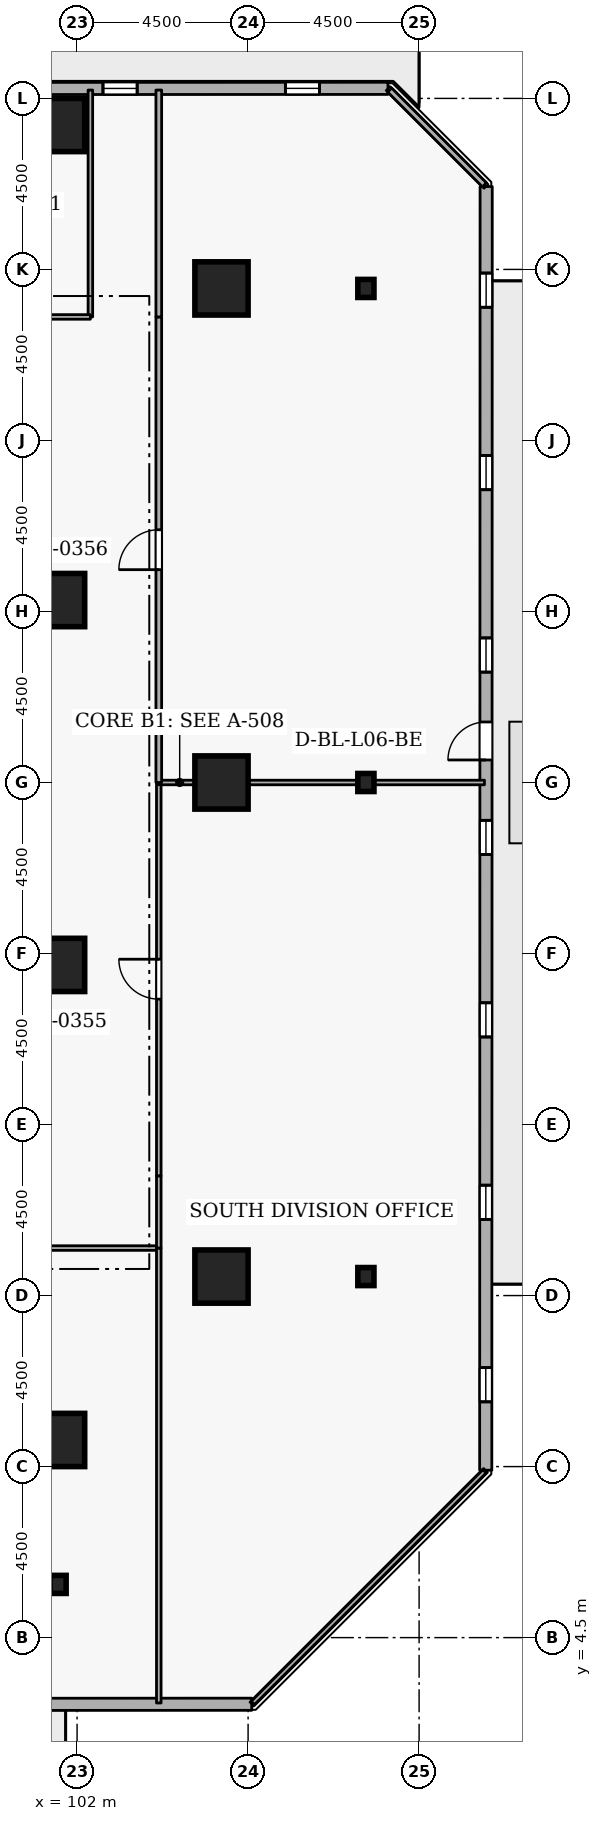
"""IFC4 building model, lengths in metres.
Left out: names, types, materials, properties, quantities, classifications, styles, units other than length and angle.
Written with IfcOpenShell. Run it as: python <this file> out.ifc"""

import sys

from ifc_helpers import new_model, si_unit, direction, frame, frame_2d, origin, origin_2d, place, context, subcontext, project, spatial, rectangle, i_section, extrude, element, fill, save


model = new_model("IFC4")
c1 = context("Model", 3, precision=1e-05, world=origin(), true_north=direction((0.0, 1.0)))
c2 = subcontext(c1, "Body", "Model", "MODEL_VIEW")
j1 = project(units=[si_unit("LENGTHUNIT", "METRE"), si_unit("PLANEANGLEUNIT", "RADIAN")], contexts=[c1])
p1 = place(None, origin())
s1 = spatial("IfcSite", under=j1, at=p1, CompositionType="ELEMENT")
p2 = place(p1, origin())
s2 = spatial("IfcBuilding", under=s1, at=p2, CompositionType="ELEMENT")
p3 = place(p2, frame((0.0, 0.0, 27.9)))
s3 = spatial("IfcBuildingStorey", under=s2, at=p3, CompositionType="ELEMENT", Elevation=27.9)
for number, where, z_axis, x_axis in (
    (1, (105.8, 14.0, 0.0), (0.0, 0.0, 1.0), (1.0, 0.0, 0.0)),
    (2, (105.8, 27.0, 0.0), (0.0, 0.0, 1.0), (1.0, 0.0, 0.0)),
    (3, (105.8, 40.0, 0.0), (0.0, 0.0, 1.0), (1.0, 0.0, 0.0)),
    (4, (101.5, 44.3, 0.0), (0.0, 0.0, 1.0), (1.0, 0.0, 0.0)),
    (5, (101.5, 9.7, 0.0), (0.0, 0.0, 1.0), (1.0, 0.0, 0.0)),
    (6, (101.5, 22.2, 0.0), (0.0, 0.0, 1.0), (1.0, 0.0, 0.0)),
    (7, (101.5, 31.8, 0.0), (0.0, 0.0, 1.0), (1.0, 0.0, 0.0)),
):
    element("IfcColumn", number, at=place(p3, frame(where, z_axis=z_axis, x_axis=x_axis)), inside=s3, PredefinedType="COLUMN", context=c2, shape_type="SweptSolid", body=[
        extrude(rectangle(XDim=1.4, YDim=1.4, at=origin_2d()), origin(), (0.0, 0.0, 1.0), 3.6),
    ])
for number, where, z_axis, x_axis in (
    (8, (109.6, 14.0, 0.0), (0.0, 0.0, 1.0), (1.0, 0.0, 0.0)),
    (9, (109.6, 27.0, 0.0), (0.0, 0.0, 1.0), (1.0, 0.0, 0.0)),
    (10, (109.6, 40.0, 0.0), (0.0, 0.0, 1.0), (1.0, 0.0, 0.0)),
    (11, (101.5, 5.9, 0.0), (0.0, 0.0, 1.0), (1.0, 0.0, 0.0)),
):
    element("IfcColumn", number, at=place(p3, frame(where, z_axis=z_axis, x_axis=x_axis)), inside=s3, PredefinedType="COLUMN", context=c2, shape_type="SweptSolid", body=[
        extrude(i_section(OverallWidth=0.424, OverallDepth=0.475, WebThickness=0.048, FlangeThickness=0.077, FilletRadius=0.015, at=origin_2d()), origin(), (0.0, 0.0, 1.0), 3.6),
    ])
p4 = place(p3, frame((72.819, 2.735, 0.0), z_axis=(0.0, 0.0, 1.0), x_axis=(0.999999942296, 0.000339718087, 0.0)))
e12 = element("IfcWall", 12, at=p4, inside=s3, PredefinedType="STANDARD", context=c2, shape_type="SweptSolid", body=[
    extrude(rectangle(XDim=33.777, YDim=0.32, at=frame_2d((16.888, 0.0))), origin(), (0.0, 0.0, 1.0), 2.7),
])
p5 = place(p4, frame((18.688, 0.0, 0.0)))
e13 = element("IfcOpeningElement", 13, at=p5, cuts=e12, PredefinedType="OPENING", context=c2, shape_type="SweptSolid", body=[
    extrude(rectangle(XDim=1.0, YDim=2.08, at=frame_2d((0.5, 1.04))), frame((0.0, 0.17, 0.0), z_axis=(0.0, -1.0, 0.0), x_axis=(1.0, 0.0, 0.0)), (0.0, 0.0, 1.0), 0.34),
])
p6 = place(p4, frame((1.8, 0.0, 0.72)))
e14 = element("IfcOpeningElement", 14, at=p6, cuts=e12, PredefinedType="OPENING", context=c2, shape_type="SweptSolid", body=[
    extrude(rectangle(XDim=0.9, YDim=1.75, at=frame_2d((0.45, 0.875))), frame((0.0, 0.17, 0.0), z_axis=(0.0, -1.0, 0.0), x_axis=(1.0, 0.0, 0.0)), (0.0, 0.0, 1.0), 0.34),
])
p7 = place(p4, frame((6.6, 0.0, 0.72)))
e15 = element("IfcOpeningElement", 15, at=p7, cuts=e12, PredefinedType="OPENING", context=c2, shape_type="SweptSolid", body=[
    extrude(rectangle(XDim=0.9, YDim=1.75, at=frame_2d((0.45, 0.875))), frame((0.0, 0.17, 0.0), z_axis=(0.0, -1.0, 0.0), x_axis=(1.0, 0.0, 0.0)), (0.0, 0.0, 1.0), 0.34),
])
p8 = place(p4, frame((11.4, 0.0, 0.72)))
e16 = element("IfcOpeningElement", 16, at=p8, cuts=e12, PredefinedType="OPENING", context=c2, shape_type="SweptSolid", body=[
    extrude(rectangle(XDim=0.9, YDim=1.75, at=frame_2d((0.45, 0.875))), frame((0.0, 0.17, 0.0), z_axis=(0.0, -1.0, 0.0), x_axis=(1.0, 0.0, 0.0)), (0.0, 0.0, 1.0), 0.34),
])
p9 = place(p4, frame((16.2, 0.0, 0.72)))
e17 = element("IfcOpeningElement", 17, at=p9, cuts=e12, PredefinedType="OPENING", context=c2, shape_type="SweptSolid", body=[
    extrude(rectangle(XDim=0.9, YDim=1.75, at=frame_2d((0.45, 0.875))), frame((0.0, 0.17, 0.0), z_axis=(0.0, -1.0, 0.0), x_axis=(1.0, 0.0, 0.0)), (0.0, 0.0, 1.0), 0.34),
])
p10 = place(p4, frame((21.0, 0.0, 0.72)))
e18 = element("IfcOpeningElement", 18, at=p10, cuts=e12, PredefinedType="OPENING", context=c2, shape_type="SweptSolid", body=[
    extrude(rectangle(XDim=0.9, YDim=1.75, at=frame_2d((0.45, 0.875))), frame((0.0, 0.17, 0.0), z_axis=(0.0, -1.0, 0.0), x_axis=(1.0, 0.0, 0.0)), (0.0, 0.0, 1.0), 0.34),
])
p11 = place(p4, frame((25.8, 0.0, 0.72)))
e19 = element("IfcOpeningElement", 19, at=p11, cuts=e12, PredefinedType="OPENING", context=c2, shape_type="SweptSolid", body=[
    extrude(rectangle(XDim=0.9, YDim=1.75, at=frame_2d((0.45, 0.875))), frame((0.0, 0.17, 0.0), z_axis=(0.0, -1.0, 0.0), x_axis=(1.0, 0.0, 0.0)), (0.0, 0.0, 1.0), 0.34),
])
p12 = place(p3, frame((112.753, 8.904, 0.0), z_axis=(0.0, 0.0, 1.0), x_axis=(0.000339718087, 0.999999942296, 0.0)))
e20 = element("IfcWall", 20, at=p12, inside=s3, PredefinedType="STANDARD", context=c2, shape_type="SweptSolid", body=[
    extrude(rectangle(XDim=33.777, YDim=0.32, at=frame_2d((16.888, 0.0))), origin(), (0.0, 0.0, 1.0), 2.7),
])
p13 = place(p12, frame((18.688, 0.0, 0.0)))
e21 = element("IfcOpeningElement", 21, at=p13, cuts=e20, PredefinedType="OPENING", context=c2, shape_type="SweptSolid", body=[
    extrude(rectangle(XDim=1.0, YDim=2.08, at=frame_2d((0.5, 1.04))), frame((0.0, 0.17, 0.0), z_axis=(0.0, -1.0, 0.0), x_axis=(1.0, 0.0, 0.0)), (0.0, 0.0, 1.0), 0.34),
])
p14 = place(p12, frame((1.8, 0.0, 0.72)))
e22 = element("IfcOpeningElement", 22, at=p14, cuts=e20, PredefinedType="OPENING", context=c2, shape_type="SweptSolid", body=[
    extrude(rectangle(XDim=0.9, YDim=1.75, at=frame_2d((0.45, 0.875))), frame((0.0, 0.17, 0.0), z_axis=(0.0, -1.0, 0.0), x_axis=(1.0, 0.0, 0.0)), (0.0, 0.0, 1.0), 0.34),
])
p15 = place(p12, frame((6.6, 0.0, 0.72)))
e23 = element("IfcOpeningElement", 23, at=p15, cuts=e20, PredefinedType="OPENING", context=c2, shape_type="SweptSolid", body=[
    extrude(rectangle(XDim=0.9, YDim=1.75, at=frame_2d((0.45, 0.875))), frame((0.0, 0.17, 0.0), z_axis=(0.0, -1.0, 0.0), x_axis=(1.0, 0.0, 0.0)), (0.0, 0.0, 1.0), 0.34),
])
p16 = place(p12, frame((11.4, 0.0, 0.72)))
e24 = element("IfcOpeningElement", 24, at=p16, cuts=e20, PredefinedType="OPENING", context=c2, shape_type="SweptSolid", body=[
    extrude(rectangle(XDim=0.9, YDim=1.75, at=frame_2d((0.45, 0.875))), frame((0.0, 0.17, 0.0), z_axis=(0.0, -1.0, 0.0), x_axis=(1.0, 0.0, 0.0)), (0.0, 0.0, 1.0), 0.34),
])
p17 = place(p12, frame((16.2, 0.0, 0.72)))
e25 = element("IfcOpeningElement", 25, at=p17, cuts=e20, PredefinedType="OPENING", context=c2, shape_type="SweptSolid", body=[
    extrude(rectangle(XDim=0.9, YDim=1.75, at=frame_2d((0.45, 0.875))), frame((0.0, 0.17, 0.0), z_axis=(0.0, -1.0, 0.0), x_axis=(1.0, 0.0, 0.0)), (0.0, 0.0, 1.0), 0.34),
])
p18 = place(p12, frame((21.0, 0.0, 0.72)))
e26 = element("IfcOpeningElement", 26, at=p18, cuts=e20, PredefinedType="OPENING", context=c2, shape_type="SweptSolid", body=[
    extrude(rectangle(XDim=0.9, YDim=1.75, at=frame_2d((0.45, 0.875))), frame((0.0, 0.17, 0.0), z_axis=(0.0, -1.0, 0.0), x_axis=(1.0, 0.0, 0.0)), (0.0, 0.0, 1.0), 0.34),
])
p19 = place(p12, frame((25.8, 0.0, 0.72)))
e27 = element("IfcOpeningElement", 27, at=p19, cuts=e20, PredefinedType="OPENING", context=c2, shape_type="SweptSolid", body=[
    extrude(rectangle(XDim=0.9, YDim=1.75, at=frame_2d((0.45, 0.875))), frame((0.0, 0.17, 0.0), z_axis=(0.0, -1.0, 0.0), x_axis=(1.0, 0.0, 0.0)), (0.0, 0.0, 1.0), 0.34),
])
p20 = place(p12, frame((30.6, 0.0, 0.72)))
e28 = element("IfcOpeningElement", 28, at=p20, cuts=e20, PredefinedType="OPENING", context=c2, shape_type="SweptSolid", body=[
    extrude(rectangle(XDim=0.9, YDim=1.75, at=frame_2d((0.45, 0.875))), frame((0.0, 0.17, 0.0), z_axis=(0.0, -1.0, 0.0), x_axis=(1.0, 0.0, 0.0)), (0.0, 0.0, 1.0), 0.34),
])
p21 = place(p3, frame((110.181, 45.265, 0.0), z_axis=(0.0, 0.0, 1.0), x_axis=(-0.999999942296, -0.000339718087, 0.0)))
e29 = element("IfcWall", 29, at=p21, inside=s3, PredefinedType="STANDARD", context=c2, shape_type="SweptSolid", body=[
    extrude(rectangle(XDim=33.777, YDim=0.32, at=frame_2d((16.888, 0.0))), origin(), (0.0, 0.0, 1.0), 2.7),
])
p22 = place(p21, frame((18.614, 0.0, 0.0)))
e30 = element("IfcOpeningElement", 30, at=p22, cuts=e29, PredefinedType="OPENING", context=c2, shape_type="SweptSolid", body=[
    extrude(rectangle(XDim=1.15, YDim=2.1, at=frame_2d((0.575, 1.05))), frame((0.0, 0.17, 0.0), z_axis=(0.0, -1.0, 0.0), x_axis=(1.0, 0.0, 0.0)), (0.0, 0.0, 1.0), 0.34),
])
p23 = place(p21, frame((1.8, 0.0, 0.72)))
e31 = element("IfcOpeningElement", 31, at=p23, cuts=e29, PredefinedType="OPENING", context=c2, shape_type="SweptSolid", body=[
    extrude(rectangle(XDim=0.9, YDim=1.75, at=frame_2d((0.45, 0.875))), frame((0.0, 0.17, 0.0), z_axis=(0.0, -1.0, 0.0), x_axis=(1.0, 0.0, 0.0)), (0.0, 0.0, 1.0), 0.34),
])
p24 = place(p21, frame((6.6, 0.0, 0.72)))
e32 = element("IfcOpeningElement", 32, at=p24, cuts=e29, PredefinedType="OPENING", context=c2, shape_type="SweptSolid", body=[
    extrude(rectangle(XDim=0.9, YDim=1.75, at=frame_2d((0.45, 0.875))), frame((0.0, 0.17, 0.0), z_axis=(0.0, -1.0, 0.0), x_axis=(1.0, 0.0, 0.0)), (0.0, 0.0, 1.0), 0.34),
])
p25 = place(p21, frame((11.4, 0.0, 0.72)))
e33 = element("IfcOpeningElement", 33, at=p25, cuts=e29, PredefinedType="OPENING", context=c2, shape_type="SweptSolid", body=[
    extrude(rectangle(XDim=0.9, YDim=1.75, at=frame_2d((0.45, 0.875))), frame((0.0, 0.17, 0.0), z_axis=(0.0, -1.0, 0.0), x_axis=(1.0, 0.0, 0.0)), (0.0, 0.0, 1.0), 0.34),
])
p26 = place(p21, frame((16.2, 0.0, 0.72)))
e34 = element("IfcOpeningElement", 34, at=p26, cuts=e29, PredefinedType="OPENING", context=c2, shape_type="SweptSolid", body=[
    extrude(rectangle(XDim=0.9, YDim=1.75, at=frame_2d((0.45, 0.875))), frame((0.0, 0.17, 0.0), z_axis=(0.0, -1.0, 0.0), x_axis=(1.0, 0.0, 0.0)), (0.0, 0.0, 1.0), 0.34),
])
p27 = place(p21, frame((25.8, 0.0, 0.72)))
e35 = element("IfcOpeningElement", 35, at=p27, cuts=e29, PredefinedType="OPENING", context=c2, shape_type="SweptSolid", body=[
    extrude(rectangle(XDim=0.9, YDim=1.75, at=frame_2d((0.45, 0.875))), frame((0.0, 0.17, 0.0), z_axis=(0.0, -1.0, 0.0), x_axis=(1.0, 0.0, 0.0)), (0.0, 0.0, 1.0), 0.34),
])
p28 = place(p21, frame((30.6, 0.0, 0.72)))
e36 = element("IfcOpeningElement", 36, at=p28, cuts=e29, PredefinedType="OPENING", context=c2, shape_type="SweptSolid", body=[
    extrude(rectangle(XDim=0.9, YDim=1.75, at=frame_2d((0.45, 0.875))), frame((0.0, 0.17, 0.0), z_axis=(0.0, -1.0, 0.0), x_axis=(1.0, 0.0, 0.0)), (0.0, 0.0, 1.0), 0.34),
])
p29 = place(p3, frame((94.8, 14.75, 0.0), z_axis=(0.0, 0.0, 1.0), x_axis=(1.0, 0.0, 0.0)))
e37 = element("IfcWall", 37, at=p29, inside=s3, PredefinedType="PARTITIONING", context=c2, shape_type="SweptSolid", body=[
    extrude(rectangle(XDim=9.35, YDim=0.12, at=frame_2d((4.675, 0.0))), origin(), (0.0, 0.0, 1.0), 3.34),
])
p30 = place(p29, frame((4.15, 0.0, 0.0)))
e38 = element("IfcOpeningElement", 38, at=p30, cuts=e37, PredefinedType="OPENING", context=c2, shape_type="SweptSolid", body=[
    extrude(rectangle(XDim=1.05, YDim=2.1, at=frame_2d((0.525, 1.05))), frame((0.0, 0.07, 0.0), z_axis=(0.0, -1.0, 0.0), x_axis=(1.0, 0.0, 0.0)), (0.0, 0.0, 1.0), 0.14),
])
p31 = place(p3, frame((104.15, 14.75, 0.0), z_axis=(0.0, 0.0, 1.0), x_axis=(0.0, -1.0, 0.0)))
e39 = element("IfcWall", 39, at=p31, inside=s3, PredefinedType="PARTITIONING", context=c2, shape_type="SweptSolid", body=[
    extrude(rectangle(XDim=11.97, YDim=0.12, at=frame_2d((5.985, 0.0))), origin(), (0.0, 0.0, 1.0), 3.34),
])
p32 = place(p3, frame((102.35, 45.22, 0.0), z_axis=(0.0, 0.0, 1.0), x_axis=(0.0, -1.0, 0.0)))
e40 = element("IfcWall", 40, at=p32, inside=s3, PredefinedType="PARTITIONING", context=c2, shape_type="SweptSolid", body=[
    extrude(rectangle(XDim=5.97, YDim=0.12, at=frame_2d((2.985, 0.0))), origin(), (0.0, 0.0, 1.0), 3.34),
])
p33 = place(p3, frame((102.35, 39.25, 0.0), z_axis=(0.0, 0.0, 1.0), x_axis=(-1.0, 0.0, 0.0)))
e41 = element("IfcWall", 41, at=p33, inside=s3, PredefinedType="PARTITIONING", context=c2, shape_type="SweptSolid", body=[
    extrude(rectangle(XDim=1.862, YDim=0.12, at=frame_2d((0.931, 0.0))), origin(), (0.0, 0.0, 1.0), 3.34),
])
p34 = place(p3, frame((104.15, 14.75, 0.0), z_axis=(0.0, 0.0, 1.0), x_axis=(0.0, 1.0, 0.0)))
e42 = element("IfcWall", 42, at=p34, inside=s3, PredefinedType="PARTITIONING", context=c2, shape_type="SweptSolid", body=[
    extrude(rectangle(XDim=1.9, YDim=0.12, at=frame_2d((0.95, 0.0))), origin(), (0.0, 0.0, 1.0), 3.34),
])
p35 = place(p3, frame((104.15, 16.65, 0.0), z_axis=(0.0, 0.0, 1.0), x_axis=(0.0, 1.0, 0.0)))
e43 = element("IfcWall", 43, at=p35, inside=s3, PredefinedType="PARTITIONING", context=c2, shape_type="SweptSolid", body=[
    extrude(rectangle(XDim=10.35, YDim=0.12, at=frame_2d((5.175, 0.0))), origin(), (0.0, 0.0, 1.0), 3.34),
])
p36 = place(p35, frame((4.65, 0.0, 0.0)))
e44 = element("IfcOpeningElement", 44, at=p36, cuts=e43, PredefinedType="OPENING", context=c2, shape_type="SweptSolid", body=[
    extrude(rectangle(XDim=1.05, YDim=2.1, at=frame_2d((0.525, 1.05))), frame((0.0, 0.07, 0.0), z_axis=(0.0, -1.0, 0.0), x_axis=(1.0, 0.0, 0.0)), (0.0, 0.0, 1.0), 0.14),
])
p37 = place(p3, frame((104.15, 27.0, 0.0), z_axis=(0.0, 0.0, 1.0), x_axis=(1.0, 0.0, 0.0)))
e45 = element("IfcWall", 45, at=p37, inside=s3, PredefinedType="PARTITIONING", context=c2, shape_type="SweptSolid", body=[
    extrude(rectangle(XDim=8.57, YDim=0.12, at=frame_2d((4.285, 0.0))), origin(), (0.0, 0.0, 1.0), 2.878),
])
p38 = place(p3, frame((112.72, 8.875, 0.0), z_axis=(0.0, 0.0, 1.0), x_axis=(-0.707106781187, -0.707106781187, 0.0)))
e46 = element("IfcWall", 46, at=p38, inside=s3, PredefinedType="PARTITIONING", context=c2, shape_type="SweptSolid", body=[
    extrude(rectangle(XDim=8.619, YDim=0.12, at=frame_2d((4.31, 0.0))), origin(), (0.0, 0.0, 1.0), 3.34),
])
p39 = place(p3, frame((104.15, 27.0, 0.0), z_axis=(0.0, 0.0, 1.0), x_axis=(0.0, 1.0, 0.0)))
e47 = element("IfcWall", 47, at=p39, inside=s3, PredefinedType="PARTITIONING", context=c2, shape_type="SweptSolid", body=[
    extrude(rectangle(XDim=12.25, YDim=0.15, at=frame_2d((6.125, 0.0))), origin(), (0.0, 0.0, 1.0), 3.34),
])
p40 = place(p39, frame((5.6, 0.0, 0.0)))
e48 = element("IfcOpeningElement", 48, at=p40, cuts=e47, PredefinedType="OPENING", context=c2, shape_type="SweptSolid", body=[
    extrude(rectangle(XDim=1.05, YDim=2.1, at=frame_2d((0.525, 1.05))), frame((0.0, 0.085, 0.0), z_axis=(0.0, -1.0, 0.0), x_axis=(1.0, 0.0, 0.0)), (0.0, 0.0, 1.0), 0.17),
])
p41 = place(p3, frame((104.15, 39.25, 0.0), z_axis=(0.0, 0.0, 1.0), x_axis=(0.0, 1.0, 0.0)))
e49 = element("IfcWall", 49, at=p41, inside=s3, PredefinedType="PARTITIONING", context=c2, shape_type="SweptSolid", body=[
    extrude(rectangle(XDim=5.97, YDim=0.15, at=frame_2d((2.985, 0.0))), origin(), (0.0, 0.0, 1.0), 3.34),
])
p42 = place(p3, frame((110.225, 45.22, 0.0), z_axis=(0.0, 0.0, 1.0), x_axis=(0.707106781187, -0.707106781187, 0.0)))
e50 = element("IfcWall", 50, at=p42, inside=s3, PredefinedType="PARTITIONING", context=c2, shape_type="SweptSolid", body=[
    extrude(rectangle(XDim=3.528, YDim=0.15, at=frame_2d((1.764, 0.0))), origin(), (0.0, 0.0, 1.0), 3.34),
])
p43 = place(p13, origin())
e51 = element("IfcDoor", 51, at=p43, inside=s3, OperationType="SINGLE_SWING_LEFT", PredefinedType="DOOR", context=c2, shape_type="SweptSolid", body=[
    extrude(rectangle(XDim=1.0, YDim=2.08, at=frame_2d((0.5, 1.04))), frame((0.0, 0.025, 0.0), z_axis=(0.0, -1.0, 0.0), x_axis=(1.0, 0.0, 0.0)), (0.0, 0.0, 1.0), 0.05),
])
fill(e21, e51)
p44 = place(p14, origin())
e52 = element("IfcWindow", 52, at=p44, inside=s3, PartitioningType="SINGLE_PANEL", PredefinedType="WINDOW", context=c2, shape_type="SweptSolid", body=[
    extrude(rectangle(XDim=0.9, YDim=1.75, at=frame_2d((0.45, 0.875))), frame((0.0, 0.03, 0.0), z_axis=(0.0, -1.0, 0.0), x_axis=(1.0, 0.0, 0.0)), (0.0, 0.0, 1.0), 0.06),
])
fill(e22, e52)
p45 = place(p15, origin())
e53 = element("IfcWindow", 53, at=p45, inside=s3, PartitioningType="SINGLE_PANEL", PredefinedType="WINDOW", context=c2, shape_type="SweptSolid", body=[
    extrude(rectangle(XDim=0.9, YDim=1.75, at=frame_2d((0.45, 0.875))), frame((0.0, 0.03, 0.0), z_axis=(0.0, -1.0, 0.0), x_axis=(1.0, 0.0, 0.0)), (0.0, 0.0, 1.0), 0.06),
])
fill(e23, e53)
p46 = place(p16, origin())
e54 = element("IfcWindow", 54, at=p46, inside=s3, PartitioningType="SINGLE_PANEL", PredefinedType="WINDOW", context=c2, shape_type="SweptSolid", body=[
    extrude(rectangle(XDim=0.9, YDim=1.75, at=frame_2d((0.45, 0.875))), frame((0.0, 0.03, 0.0), z_axis=(0.0, -1.0, 0.0), x_axis=(1.0, 0.0, 0.0)), (0.0, 0.0, 1.0), 0.06),
])
fill(e24, e54)
p47 = place(p17, origin())
e55 = element("IfcWindow", 55, at=p47, inside=s3, PartitioningType="SINGLE_PANEL", PredefinedType="WINDOW", context=c2, shape_type="SweptSolid", body=[
    extrude(rectangle(XDim=0.9, YDim=1.75, at=frame_2d((0.45, 0.875))), frame((0.0, 0.03, 0.0), z_axis=(0.0, -1.0, 0.0), x_axis=(1.0, 0.0, 0.0)), (0.0, 0.0, 1.0), 0.06),
])
fill(e25, e55)
p48 = place(p18, origin())
e56 = element("IfcWindow", 56, at=p48, inside=s3, PartitioningType="SINGLE_PANEL", PredefinedType="WINDOW", context=c2, shape_type="SweptSolid", body=[
    extrude(rectangle(XDim=0.9, YDim=1.75, at=frame_2d((0.45, 0.875))), frame((0.0, 0.03, 0.0), z_axis=(0.0, -1.0, 0.0), x_axis=(1.0, 0.0, 0.0)), (0.0, 0.0, 1.0), 0.06),
])
fill(e26, e56)
p49 = place(p19, origin())
e57 = element("IfcWindow", 57, at=p49, inside=s3, PartitioningType="SINGLE_PANEL", PredefinedType="WINDOW", context=c2, shape_type="SweptSolid", body=[
    extrude(rectangle(XDim=0.9, YDim=1.75, at=frame_2d((0.45, 0.875))), frame((0.0, 0.03, 0.0), z_axis=(0.0, -1.0, 0.0), x_axis=(1.0, 0.0, 0.0)), (0.0, 0.0, 1.0), 0.06),
])
fill(e27, e57)
p50 = place(p20, origin())
e58 = element("IfcWindow", 58, at=p50, inside=s3, PartitioningType="SINGLE_PANEL", PredefinedType="WINDOW", context=c2, shape_type="SweptSolid", body=[
    extrude(rectangle(XDim=0.9, YDim=1.75, at=frame_2d((0.45, 0.875))), frame((0.0, 0.03, 0.0), z_axis=(0.0, -1.0, 0.0), x_axis=(1.0, 0.0, 0.0)), (0.0, 0.0, 1.0), 0.06),
])
fill(e28, e58)
p51 = place(p23, origin())
e59 = element("IfcWindow", 59, at=p51, inside=s3, PartitioningType="SINGLE_PANEL", PredefinedType="WINDOW", context=c2, shape_type="SweptSolid", body=[
    extrude(rectangle(XDim=0.9, YDim=1.75, at=frame_2d((0.45, 0.875))), frame((0.0, 0.03, 0.0), z_axis=(0.0, -1.0, 0.0), x_axis=(1.0, 0.0, 0.0)), (0.0, 0.0, 1.0), 0.06),
])
fill(e31, e59)
p52 = place(p24, origin())
e60 = element("IfcWindow", 60, at=p52, inside=s3, PartitioningType="SINGLE_PANEL", PredefinedType="WINDOW", context=c2, shape_type="SweptSolid", body=[
    extrude(rectangle(XDim=0.9, YDim=1.75, at=frame_2d((0.45, 0.875))), frame((0.0, 0.03, 0.0), z_axis=(0.0, -1.0, 0.0), x_axis=(1.0, 0.0, 0.0)), (0.0, 0.0, 1.0), 0.06),
])
fill(e32, e60)
p53 = place(p36, origin())
e61 = element("IfcDoor", 61, at=p53, inside=s3, OperationType="SINGLE_SWING_RIGHT", PredefinedType="DOOR", context=c2, shape_type="SweptSolid", body=[
    extrude(rectangle(XDim=1.05, YDim=2.1, at=frame_2d((0.525, 1.05))), frame((0.0, 0.025, 0.0), z_axis=(0.0, -1.0, 0.0), x_axis=(1.0, 0.0, 0.0)), (0.0, 0.0, 1.0), 0.05),
])
fill(e44, e61)
p54 = place(p40, origin())
e62 = element("IfcDoor", 62, at=p54, inside=s3, OperationType="SINGLE_SWING_LEFT", PredefinedType="DOOR", context=c2, shape_type="SweptSolid", body=[
    extrude(rectangle(XDim=1.05, YDim=2.1, at=frame_2d((0.525, 1.05))), frame((0.0, 0.025, 0.0), z_axis=(0.0, -1.0, 0.0), x_axis=(1.0, 0.0, 0.0)), (0.0, 0.0, 1.0), 0.05),
])
fill(e48, e62)
save(model, sys.argv[1])
